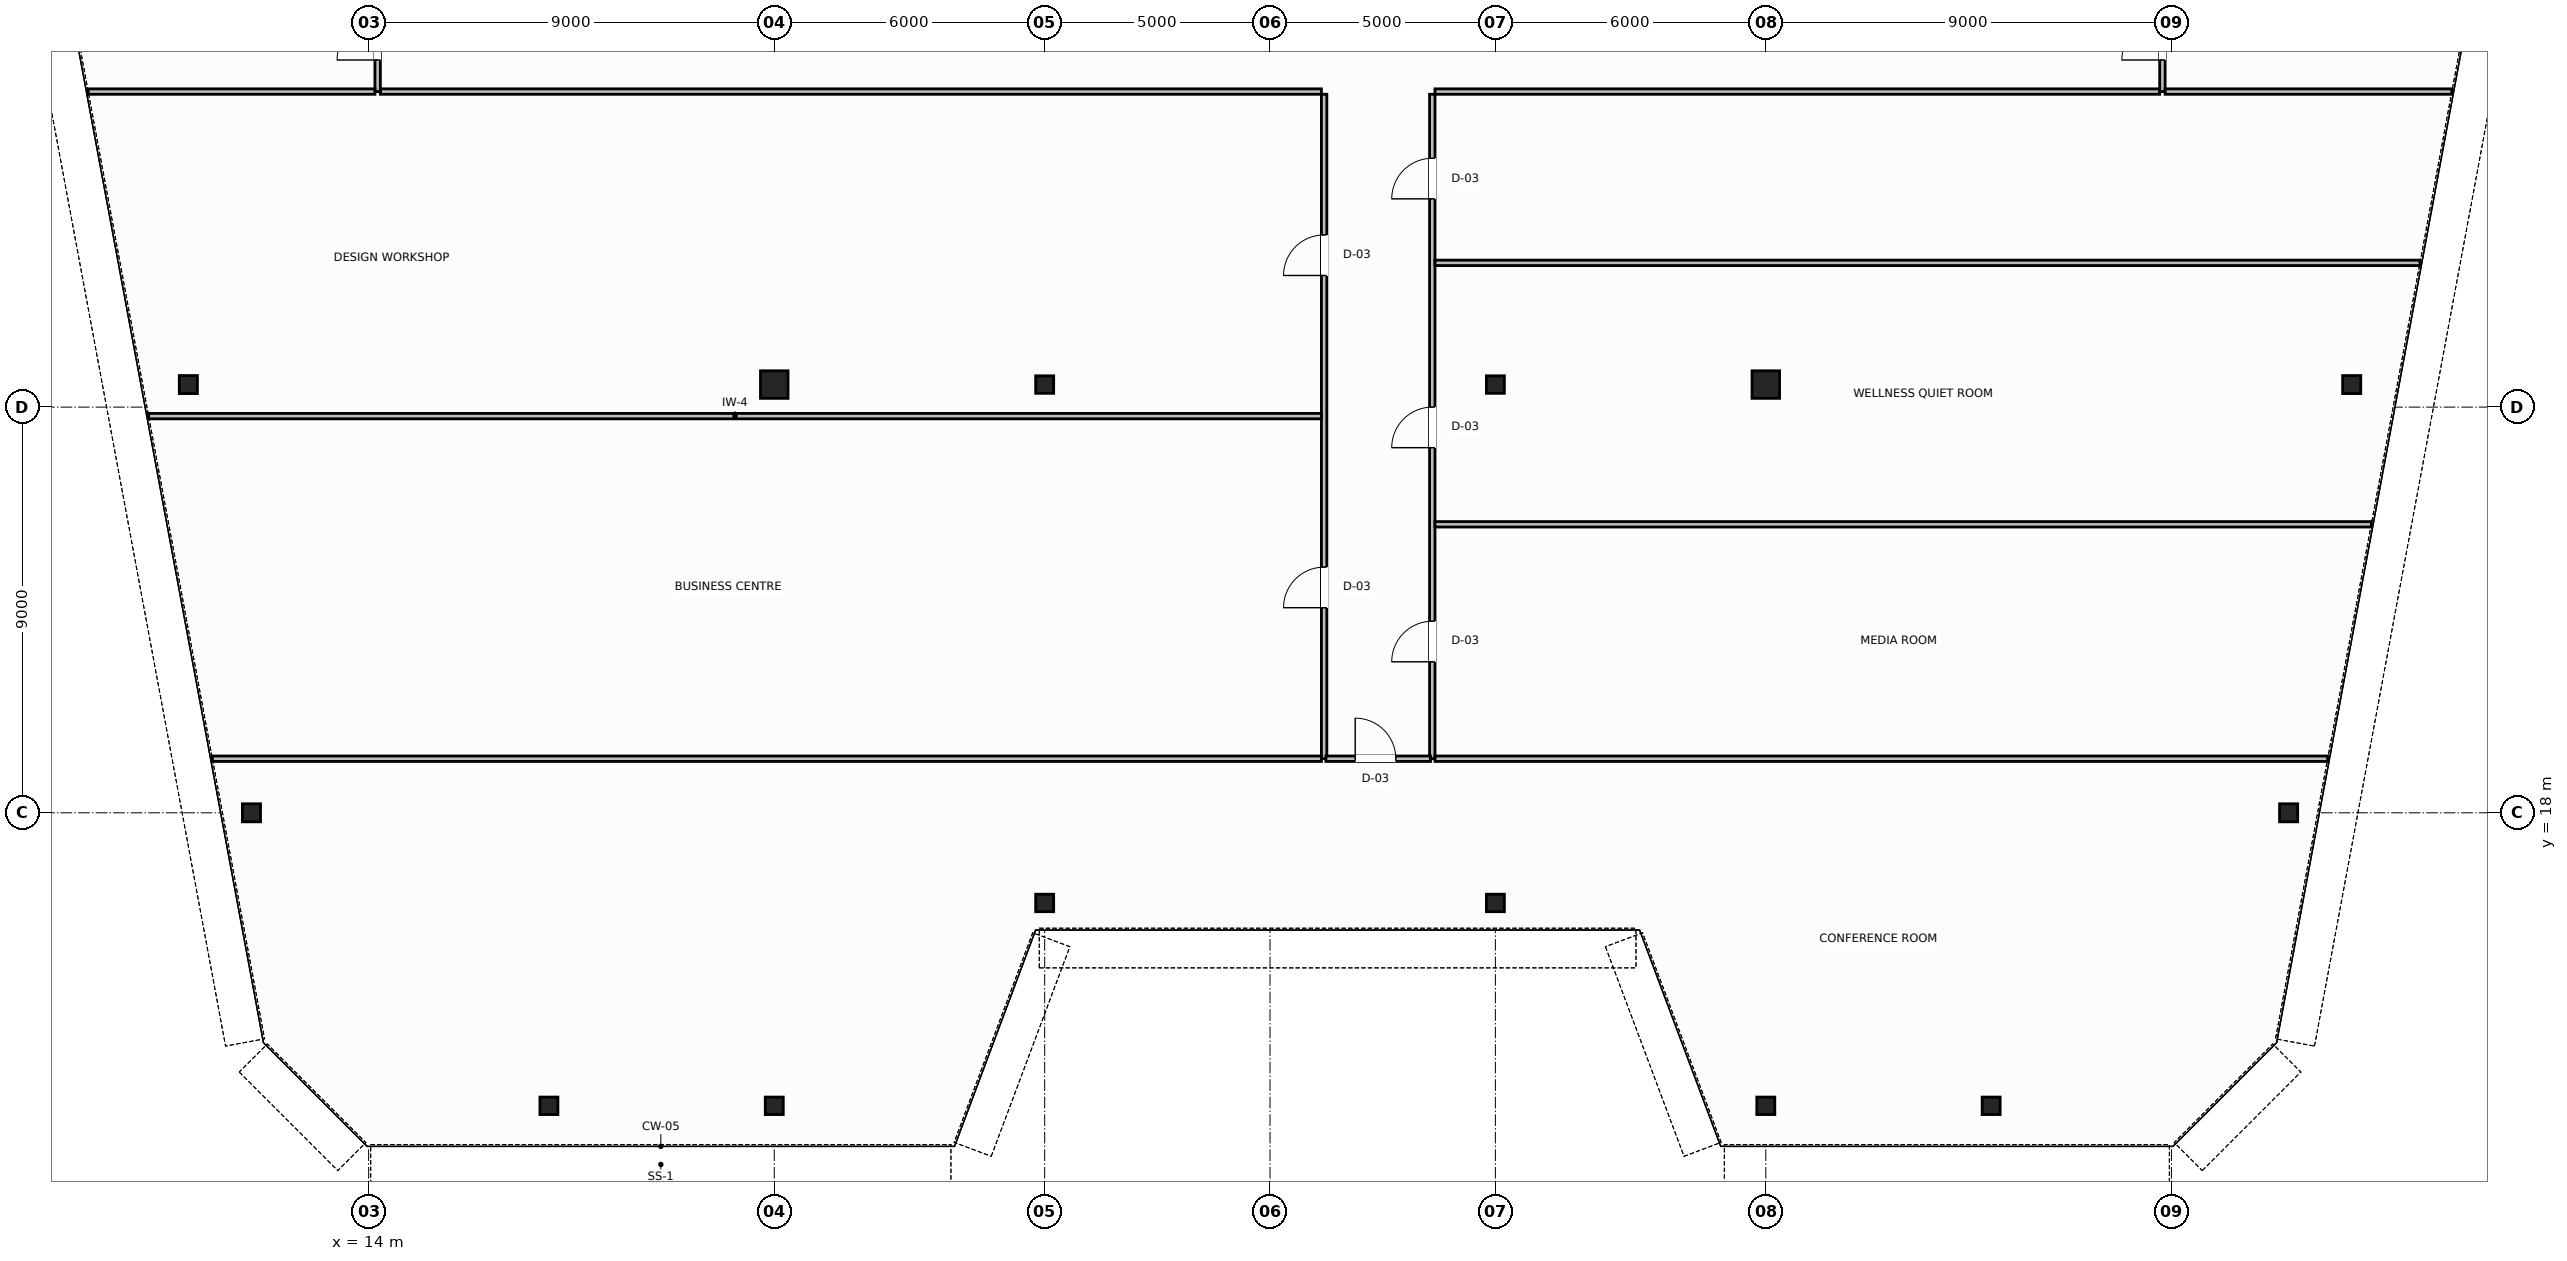
"""IFC4 building model, lengths in metres.
Left out: names, types, materials, properties, quantities, classifications, styles, units other than length and angle.
Written with IfcOpenShell. Run it as: python <this file> out.ifc"""

import sys

from ifc_helpers import new_model, si_unit, direction, frame, frame_2d, origin, origin_2d, place, context, subcontext, project, spatial, rectangle, hollow_circle, i_section, extrude, source, transform, mapped, element, fill, save


model = new_model("IFC4")
c1 = context("Model", 3, precision=1e-05, world=origin(), true_north=direction((0.0, 1.0)))
c2 = subcontext(c1, "Body", "Model", "MODEL_VIEW")
j1 = project(units=[si_unit("LENGTHUNIT", "METRE"), si_unit("PLANEANGLEUNIT", "RADIAN")], contexts=[c1])
p1 = place(None, origin())
s1 = spatial("IfcSite", under=j1, at=p1, CompositionType="ELEMENT")
p2 = place(p1, origin())
s2 = spatial("IfcBuilding", under=s1, at=p2, CompositionType="ELEMENT")
p3 = place(p2, frame((0.0, 0.0, 246.0)))
s3 = spatial("IfcBuildingStorey", under=s2, at=p3, CompositionType="ELEMENT", Elevation=246.0)
m1 = source(origin(), c2, "Body", "SweptSolid", [
    extrude(i_section(OverallWidth=0.401, OverallDepth=0.399, WebThickness=0.025, FlangeThickness=0.035, FilletRadius=0.015, at=origin_2d()), origin(), (0.0, 0.0, 1.0), 3.8),
])
for number, where, z_axis, x_axis in (
    (1, (10.0, 27.5, 0.0), (0.0, 0.0, 1.0), (1.0, 0.0, 0.0)),
    (2, (11.4, 18.0, 0.0), (0.0, 0.0, 1.0), (1.0, 0.0, 0.0)),
    (3, (58.0, 27.5, 0.0), (0.0, 0.0, 1.0), (1.0, 0.0, 0.0)),
    (4, (56.6, 18.0, 0.0), (0.0, 0.0, 1.0), (1.0, 0.0, 0.0)),
):
    element("IfcColumn", number, at=place(p3, frame(where, z_axis=z_axis, x_axis=x_axis)), inside=s3, PredefinedType="COLUMN", context=c2, shape_type="MappedRepresentation", body=[
        mapped(m1, transform((0.0, 0.0, 0.0), scale=1.0)),
    ])
m2 = source(origin(), c2, "Body", "SweptSolid", [
    extrude(hollow_circle(Radius=0.305, WallThickness=0.03, at=origin_2d()), origin(), (0.0, 0.0, 1.0), 3.8),
])
p4 = place(p3, frame((23.0, 27.5, 0.0), z_axis=(0.0, 0.0, 1.0), x_axis=(1.0, 0.0, 0.0)))
e5 = element("IfcColumn", 5, at=p4, inside=s3, PredefinedType="COLUMN", context=c2, shape_type="MappedRepresentation", body=[
    mapped(m2, transform((0.0, 0.0, 0.0), scale=1.0)),
])
m3 = source(origin(), c2, "Body", "SweptSolid", [
    extrude(i_section(OverallWidth=0.398, OverallDepth=0.387, WebThickness=0.021, FlangeThickness=0.029, FilletRadius=0.015, at=origin_2d()), origin(), (0.0, 0.0, 1.0), 3.8),
])
for number, where, z_axis, x_axis in (
    (6, (29.0, 27.5, 0.0), (0.0, 0.0, 1.0), (1.0, 0.0, 0.0)),
    (7, (39.0, 27.5, 0.0), (0.0, 0.0, 1.0), (1.0, 0.0, 0.0)),
):
    element("IfcColumn", number, at=place(p3, frame(where, z_axis=z_axis, x_axis=x_axis)), inside=s3, PredefinedType="COLUMN", context=c2, shape_type="MappedRepresentation", body=[
        mapped(m3, transform((0.0, 0.0, 0.0), scale=1.0)),
    ])
p5 = place(p3, frame((45.0, 27.5, 0.0), z_axis=(0.0, 0.0, 1.0), x_axis=(1.0, 0.0, 0.0)))
e8 = element("IfcColumn", 8, at=p5, inside=s3, PredefinedType="COLUMN", context=c2, shape_type="MappedRepresentation", body=[
    mapped(m2, transform((0.0, 0.0, 0.0), scale=1.0)),
])
for number, where, z_axis, x_axis in (
    (9, (18.0, 11.5, 0.0), (0.0, 0.0, 1.0), (1.0, 0.0, 0.0)),
    (10, (23.0, 11.5, 0.0), (0.0, 0.0, 1.0), (1.0, 0.0, 0.0)),
    (11, (29.0, 16.0, 0.0), (0.0, 0.0, 1.0), (1.0, 0.0, 0.0)),
    (12, (39.0, 16.0, 0.0), (0.0, 0.0, 1.0), (1.0, 0.0, 0.0)),
    (13, (45.0, 11.5, 0.0), (0.0, 0.0, 1.0), (1.0, 0.0, 0.0)),
    (14, (50.0, 11.5, 0.0), (0.0, 0.0, 1.0), (1.0, 0.0, 0.0)),
):
    element("IfcColumn", number, at=place(p3, frame(where, z_axis=z_axis, x_axis=x_axis)), inside=s3, PredefinedType="COLUMN", context=c2, shape_type="MappedRepresentation", body=[
        mapped(m3, transform((0.0, 0.0, 0.0), scale=1.0)),
    ])
p6 = place(p3, frame((14.26, 34.0, 0.0), z_axis=(0.0, 0.0, 1.0), x_axis=(1.0, 0.0, 0.0)))
e15 = element("IfcWall", 15, at=p6, inside=s3, PredefinedType="PARTITIONING", context=c2, shape_type="SweptSolid", body=[
    extrude(rectangle(XDim=20.88, YDim=0.12, at=frame_2d((10.44, 0.0))), origin(), (0.0, 0.0, 1.0), 3.58),
])
p7 = place(p3, frame((37.66, 34.0, 0.0), z_axis=(0.0, 0.0, 1.0), x_axis=(1.0, 0.0, 0.0)))
e16 = element("IfcWall", 16, at=p7, inside=s3, PredefinedType="PARTITIONING", context=c2, shape_type="SweptSolid", body=[
    extrude(rectangle(XDim=16.08, YDim=0.12, at=frame_2d((8.04, 0.0))), origin(), (0.0, 0.0, 1.0), 3.58),
])
p8 = place(p3, frame((14.2, 34.0, 0.0), z_axis=(0.0, 0.0, 1.0), x_axis=(0.0, 1.0, 0.0)))
e17 = element("IfcWall", 17, at=p8, inside=s3, PredefinedType="PARTITIONING", context=c2, shape_type="SweptSolid", body=[
    extrude(rectangle(XDim=2.44, YDim=0.12, at=frame_2d((1.22, 0.0))), origin(), (0.0, 0.0, 1.0), 3.58),
])
p9 = place(p8, frame((0.7, 0.0, 0.0)))
e18 = element("IfcOpeningElement", 18, at=p9, cuts=e17, PredefinedType="OPENING", context=c2, shape_type="SweptSolid", body=[
    extrude(rectangle(XDim=0.9, YDim=2.15, at=frame_2d((0.45, 1.075))), frame((0.0, 0.07, 0.0), z_axis=(0.0, -1.0, 0.0), x_axis=(1.0, 0.0, 0.0)), (0.0, 0.0, 1.0), 0.14),
])
p10 = place(p3, frame((53.8, 34.0, 0.0), z_axis=(0.0, 0.0, 1.0), x_axis=(0.0, 1.0, 0.0)))
e19 = element("IfcWall", 19, at=p10, inside=s3, PredefinedType="PARTITIONING", context=c2, shape_type="SweptSolid", body=[
    extrude(rectangle(XDim=2.44, YDim=0.12, at=frame_2d((1.22, 0.0))), origin(), (0.0, 0.0, 1.0), 3.58),
])
p11 = place(p10, frame((0.7, 0.0, 0.0)))
e20 = element("IfcOpeningElement", 20, at=p11, cuts=e19, PredefinedType="OPENING", context=c2, shape_type="SweptSolid", body=[
    extrude(rectangle(XDim=0.9, YDim=2.15, at=frame_2d((0.45, 1.075))), frame((0.0, 0.07, 0.0), z_axis=(0.0, -1.0, 0.0), x_axis=(1.0, 0.0, 0.0)), (0.0, 0.0, 1.0), 0.14),
])
p12 = place(p3, frame((35.2, 19.2, 0.0), z_axis=(0.0, 0.0, 1.0), x_axis=(0.0, 1.0, 0.0)))
e21 = element("IfcWall", 21, at=p12, inside=s3, PredefinedType="PARTITIONING", context=c2, shape_type="SweptSolid", body=[
    extrude(rectangle(XDim=14.74, YDim=0.12, at=frame_2d((7.37, 0.0))), origin(), (0.0, 0.0, 1.0), 3.58),
])
p13 = place(p12, frame((3.35, 0.0, 0.0)))
e22 = element("IfcOpeningElement", 22, at=p13, cuts=e21, PredefinedType="OPENING", context=c2, shape_type="SweptSolid", body=[
    extrude(rectangle(XDim=0.9, YDim=2.15, at=frame_2d((0.45, 1.075))), frame((0.0, 0.07, 0.0), z_axis=(0.0, -1.0, 0.0), x_axis=(1.0, 0.0, 0.0)), (0.0, 0.0, 1.0), 0.14),
])
p14 = place(p12, frame((10.72, 0.0, 0.0)))
e23 = element("IfcOpeningElement", 23, at=p14, cuts=e21, PredefinedType="OPENING", context=c2, shape_type="SweptSolid", body=[
    extrude(rectangle(XDim=0.9, YDim=2.15, at=frame_2d((0.45, 1.075))), frame((0.0, 0.07, 0.0), z_axis=(0.0, -1.0, 0.0), x_axis=(1.0, 0.0, 0.0)), (0.0, 0.0, 1.0), 0.14),
])
p15 = place(p3, frame((37.6, 19.2, 0.0), z_axis=(0.0, 0.0, 1.0), x_axis=(0.0, 1.0, 0.0)))
e24 = element("IfcWall", 24, at=p15, inside=s3, PredefinedType="PARTITIONING", context=c2, shape_type="SweptSolid", body=[
    extrude(rectangle(XDim=14.74, YDim=0.12, at=frame_2d((7.37, 0.0))), origin(), (0.0, 0.0, 1.0), 3.58),
])
p16 = place(p15, frame((2.15, 0.0, 0.0)))
e25 = element("IfcOpeningElement", 25, at=p16, cuts=e24, PredefinedType="OPENING", context=c2, shape_type="SweptSolid", body=[
    extrude(rectangle(XDim=0.9, YDim=2.15, at=frame_2d((0.45, 1.075))), frame((0.0, 0.07, 0.0), z_axis=(0.0, -1.0, 0.0), x_axis=(1.0, 0.0, 0.0)), (0.0, 0.0, 1.0), 0.14),
])
p17 = place(p15, frame((6.9, 0.0, 0.0)))
e26 = element("IfcOpeningElement", 26, at=p17, cuts=e24, PredefinedType="OPENING", context=c2, shape_type="SweptSolid", body=[
    extrude(rectangle(XDim=0.9, YDim=2.15, at=frame_2d((0.45, 1.075))), frame((0.0, 0.07, 0.0), z_axis=(0.0, -1.0, 0.0), x_axis=(1.0, 0.0, 0.0)), (0.0, 0.0, 1.0), 0.14),
])
p18 = place(p15, frame((12.42, 0.0, 0.0)))
e27 = element("IfcOpeningElement", 27, at=p18, cuts=e24, PredefinedType="OPENING", context=c2, shape_type="SweptSolid", body=[
    extrude(rectangle(XDim=0.9, YDim=2.15, at=frame_2d((0.45, 1.075))), frame((0.0, 0.07, 0.0), z_axis=(0.0, -1.0, 0.0), x_axis=(1.0, 0.0, 0.0)), (0.0, 0.0, 1.0), 0.14),
])
p19 = place(p3, frame((35.24, 19.2, 0.0), z_axis=(0.0, 0.0, 1.0), x_axis=(1.0, 0.0, 0.0)))
e28 = element("IfcWall", 28, at=p19, inside=s3, PredefinedType="PARTITIONING", context=c2, shape_type="SweptSolid", body=[
    extrude(rectangle(XDim=2.32, YDim=0.12, at=frame_2d((1.16, 0.0))), origin(), (0.0, 0.0, 1.0), 3.58),
])
p20 = place(p19, frame((0.65, 0.0, 0.0)))
e29 = element("IfcOpeningElement", 29, at=p20, cuts=e28, PredefinedType="OPENING", context=c2, shape_type="SweptSolid", body=[
    extrude(rectangle(XDim=0.9, YDim=2.15, at=frame_2d((0.45, 1.075))), frame((0.0, 0.07, 0.0), z_axis=(0.0, -1.0, 0.0), x_axis=(1.0, 0.0, 0.0)), (0.0, 0.0, 1.0), 0.14),
])
for number, where, z_axis, x_axis in (
    (30, (7.777, 34.0, 0.0), (0.0, 0.0, 1.0), (1.0, 0.0, 0.0)),
    (31, (53.86, 34.0, 0.0), (0.0, 0.0, 1.0), (1.0, 0.0, 0.0)),
):
    element("IfcWall", number, at=place(p3, frame(where, z_axis=z_axis, x_axis=x_axis)), inside=s3, PredefinedType="PARTITIONING", context=c2, shape_type="SweptSolid", body=[
        extrude(rectangle(XDim=6.363, YDim=0.12, at=frame_2d((3.181, 0.0))), origin(), (0.0, 0.0, 1.0), 3.58),
    ])
p21 = place(p3, frame((9.118, 26.8, 0.0), z_axis=(0.0, 0.0, 1.0), x_axis=(1.0, 0.0, 0.0)))
e32 = element("IfcWall", 32, at=p21, inside=s3, PredefinedType="PARTITIONING", context=c2, shape_type="SweptSolid", body=[
    extrude(rectangle(XDim=26.022, YDim=0.12, at=frame_2d((13.011, 0.0))), origin(), (0.0, 0.0, 1.0), 3.58),
])
p22 = place(p3, frame((37.66, 24.4, 0.0), z_axis=(0.0, 0.0, 1.0), x_axis=(1.0, 0.0, 0.0)))
e33 = element("IfcWall", 33, at=p22, inside=s3, PredefinedType="PARTITIONING", context=c2, shape_type="SweptSolid", body=[
    extrude(rectangle(XDim=20.775, YDim=0.12, at=frame_2d((10.388, 0.0))), origin(), (0.0, 0.0, 1.0), 3.17),
])
p23 = place(p3, frame((37.66, 30.2, 0.0), z_axis=(0.0, 0.0, 1.0), x_axis=(1.0, 0.0, 0.0)))
e34 = element("IfcWall", 34, at=p23, inside=s3, PredefinedType="PARTITIONING", context=c2, shape_type="SweptSolid", body=[
    extrude(rectangle(XDim=21.855, YDim=0.12, at=frame_2d((10.928, 0.0))), origin(), (0.0, 0.0, 1.0), 3.17),
])
p24 = place(p3, frame((10.533, 19.2, 0.0), z_axis=(0.0, 0.0, 1.0), x_axis=(1.0, 0.0, 0.0)))
e35 = element("IfcWall", 35, at=p24, inside=s3, PredefinedType="PARTITIONING", context=c2, shape_type="SweptSolid", body=[
    extrude(rectangle(XDim=24.607, YDim=0.12, at=frame_2d((12.303, 0.0))), origin(), (0.0, 0.0, 1.0), 3.58),
])
p25 = place(p3, frame((37.66, 19.2, 0.0), z_axis=(0.0, 0.0, 1.0), x_axis=(1.0, 0.0, 0.0)))
e36 = element("IfcWall", 36, at=p25, inside=s3, PredefinedType="PARTITIONING", context=c2, shape_type="SweptSolid", body=[
    extrude(rectangle(XDim=19.807, YDim=0.12, at=frame_2d((9.904, 0.0))), origin(), (0.0, 0.0, 1.0), 3.58),
])
m4 = source(origin(), c2, "Body", "SweptSolid", [
    extrude(rectangle(XDim=0.9, YDim=2.15, at=frame_2d((0.45, 1.075))), frame((0.0, 0.025, 0.0), z_axis=(0.0, -1.0, 0.0), x_axis=(1.0, 0.0, 0.0)), (0.0, 0.0, 1.0), 0.05),
])
p26 = place(p9, origin())
e37 = element("IfcDoor", 37, at=p26, inside=s3, OperationType="SINGLE_SWING_LEFT", PredefinedType="DOOR", context=c2, shape_type="MappedRepresentation", body=[
    mapped(m4, transform((0.0, 0.0, 0.0), scale=1.0)),
])
fill(e18, e37)
p27 = place(p11, origin())
e38 = element("IfcDoor", 38, at=p27, inside=s3, OperationType="SINGLE_SWING_RIGHT", PredefinedType="DOOR", context=c2, shape_type="MappedRepresentation", body=[
    mapped(m4, transform((0.0, 0.0, 0.0), scale=1.0)),
])
fill(e20, e38)
p28 = place(p13, origin())
e39 = element("IfcDoor", 39, at=p28, inside=s3, OperationType="SINGLE_SWING_LEFT", PredefinedType="DOOR", context=c2, shape_type="MappedRepresentation", body=[
    mapped(m4, transform((0.0, 0.0, 0.0), scale=1.0)),
])
fill(e22, e39)
p29 = place(p14, origin())
e40 = element("IfcDoor", 40, at=p29, inside=s3, OperationType="SINGLE_SWING_RIGHT", PredefinedType="DOOR", context=c2, shape_type="MappedRepresentation", body=[
    mapped(m4, transform((0.0, 0.0, 0.0), scale=1.0)),
])
fill(e23, e40)
p30 = place(p16, origin())
e41 = element("IfcDoor", 41, at=p30, inside=s3, OperationType="SINGLE_SWING_RIGHT", PredefinedType="DOOR", context=c2, shape_type="MappedRepresentation", body=[
    mapped(m4, transform((0.0, 0.0, 0.0), scale=1.0)),
])
fill(e25, e41)
p31 = place(p17, origin())
e42 = element("IfcDoor", 42, at=p31, inside=s3, OperationType="SINGLE_SWING_LEFT", PredefinedType="DOOR", context=c2, shape_type="MappedRepresentation", body=[
    mapped(m4, transform((0.0, 0.0, 0.0), scale=1.0)),
])
fill(e26, e42)
p32 = place(p18, origin())
e43 = element("IfcDoor", 43, at=p32, inside=s3, OperationType="SINGLE_SWING_RIGHT", PredefinedType="DOOR", context=c2, shape_type="MappedRepresentation", body=[
    mapped(m4, transform((0.0, 0.0, 0.0), scale=1.0)),
])
fill(e27, e43)
p33 = place(p20, origin())
e44 = element("IfcDoor", 44, at=p33, inside=s3, OperationType="SINGLE_SWING_LEFT", PredefinedType="DOOR", context=c2, shape_type="MappedRepresentation", body=[
    mapped(m4, transform((0.0, 0.0, 0.0), scale=1.0)),
])
fill(e29, e44)
save(model, sys.argv[1])
